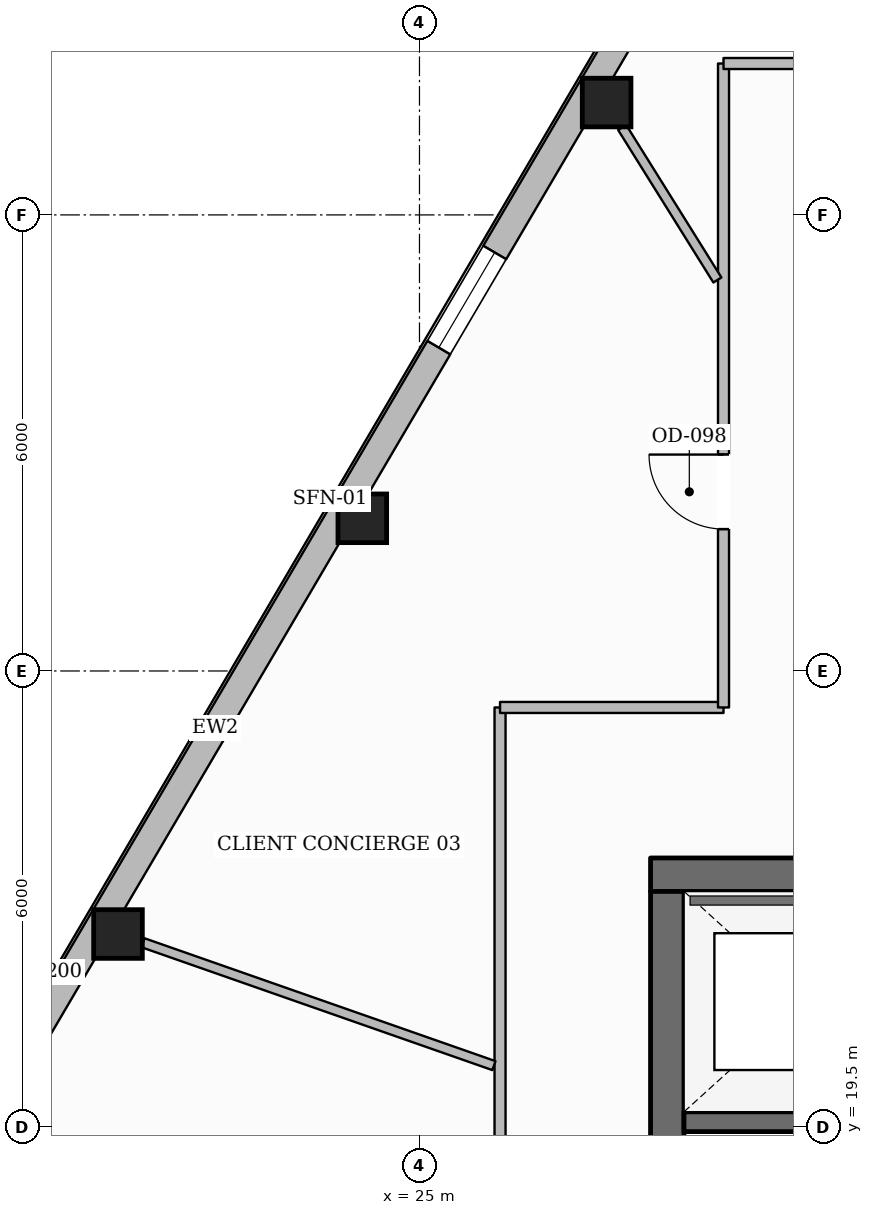
"""IFC4 building model, lengths in metres.
Left out: names, types, materials, properties, quantities, classifications, styles, units other than length and angle.
Written with IfcOpenShell. Run it as: python <this file> out.ifc"""

import sys

from ifc_helpers import new_model, si_unit, direction, frame, frame_2d, origin, origin_2d, place, context, subcontext, project, spatial, rectangle, hollow_rectangle, extrude, element, fill, save


model = new_model("IFC4")
c1 = context("Model", 3, precision=1e-05, world=origin(), true_north=direction((0.0, 1.0)))
c2 = subcontext(c1, "Body", "Model", "MODEL_VIEW")
j1 = project(units=[si_unit("LENGTHUNIT", "METRE"), si_unit("PLANEANGLEUNIT", "RADIAN")], contexts=[c1])
p1 = place(None, origin())
s1 = spatial("IfcSite", under=j1, at=p1, CompositionType="ELEMENT")
p2 = place(p1, origin())
s2 = spatial("IfcBuilding", under=s1, at=p2, CompositionType="ELEMENT")
p3 = place(p2, frame((0.0, 0.0, 215.05)))
s3 = spatial("IfcBuildingStorey", under=s2, at=p3, CompositionType="ELEMENT", Elevation=215.05)
p4 = place(p3, frame((28.04, 22.82, 0.0), z_axis=(0.0, 0.0, 1.0), x_axis=(1.0, 0.0, 0.0)))
e1 = element("IfcWall", 1, at=p4, inside=s3, PredefinedType="SOLIDWALL", context=c2, shape_type="SweptSolid", body=[
    extrude(rectangle(XDim=19.92, YDim=0.44, at=frame_2d((9.96, 0.0))), origin(), (0.0, 0.0, 1.0), 3.6),
])
p5 = place(p4, frame((6.235, 0.0, 0.0)))
e2 = element("IfcOpeningElement", 2, at=p5, cuts=e1, PredefinedType="OPENING", context=c2, shape_type="SweptSolid", body=[
    extrude(rectangle(XDim=1.05, YDim=2.15, at=frame_2d((0.525, 1.075))), frame((0.0, 0.23, 0.0), z_axis=(0.0, -1.0, 0.0), x_axis=(1.0, 0.0, 0.0)), (0.0, 0.0, 1.0), 0.46),
])
p6 = place(p4, frame((12.635, 0.0, 0.0)))
e3 = element("IfcOpeningElement", 3, at=p6, cuts=e1, PredefinedType="OPENING", context=c2, shape_type="SweptSolid", body=[
    extrude(rectangle(XDim=1.05, YDim=2.15, at=frame_2d((0.525, 1.075))), frame((0.0, 0.23, 0.0), z_axis=(0.0, -1.0, 0.0), x_axis=(1.0, 0.0, 0.0)), (0.0, 0.0, 1.0), 0.46),
])
p7 = place(p3, frame((28.26, 9.6, 0.0), z_axis=(0.0, 0.0, 1.0), x_axis=(0.0, 1.0, 0.0)))
e4 = element("IfcWall", 4, at=p7, inside=s3, PredefinedType="SOLIDWALL", context=c2, shape_type="SweptSolid", body=[
    extrude(rectangle(XDim=13.0, YDim=0.44, at=frame_2d((6.5, 0.0))), origin(), (0.0, 0.0, 1.0), 3.6),
])
p8 = place(p7, frame((0.2, 0.0, 0.0)))
e5 = element("IfcOpeningElement", 5, at=p8, cuts=e4, PredefinedType="OPENING", context=c2, shape_type="SweptSolid", body=[
    extrude(rectangle(XDim=1.1, YDim=2.15, at=frame_2d((0.55, 1.075))), frame((0.0, 0.23, 0.0), z_axis=(0.0, -1.0, 0.0), x_axis=(1.0, 0.0, 0.0)), (0.0, 0.0, 1.0), 0.46),
])
p9 = place(p7, frame((8.4, 0.0, 0.0)))
e6 = element("IfcOpeningElement", 6, at=p9, cuts=e4, PredefinedType="OPENING", context=c2, shape_type="SweptSolid", body=[
    extrude(rectangle(XDim=0.9, YDim=2.1, at=frame_2d((0.45, 1.05))), frame((0.0, 0.23, 0.0), z_axis=(0.0, -1.0, 0.0), x_axis=(1.0, 0.0, 0.0)), (0.0, 0.0, 1.0), 0.46),
])
p10 = place(p3, frame((28.48, 19.57, 0.0), z_axis=(0.0, 0.0, 1.0), x_axis=(1.0, 0.0, 0.0)))
e7 = element("IfcWall", 7, at=p10, inside=s3, PredefinedType="SHEAR", context=c2, shape_type="SweptSolid", body=[
    extrude(rectangle(XDim=3.2, YDim=0.26, at=frame_2d((1.6, 0.0))), origin(), (0.0, 0.0, 1.0), 3.6),
])
for number, where, z_axis, x_axis in (
    (8, (27.462, 32.978, 0.0), (0.0, 0.0, 1.0), (1.0, 0.0, 0.0)),
    (9, (24.248, 27.509, 0.0), (0.0, 0.0, 1.0), (1.0, 0.0, 0.0)),
    (10, (21.034, 22.04, 0.0), (0.0, 0.0, 1.0), (1.0, 0.0, 0.0)),
):
    element("IfcColumn", number, at=place(p3, frame(where, z_axis=z_axis, x_axis=x_axis)), inside=s3, PredefinedType="COLUMN", context=c2, shape_type="SweptSolid", body=[
        extrude(hollow_rectangle(XDim=0.64, YDim=0.64, WallThickness=0.028, at=origin_2d()), origin(), (0.0, 0.0, 1.0), 3.6),
    ])
p11 = place(p3, frame((14.13, 10.825, 0.0), z_axis=(0.0, 0.0, 1.0), x_axis=(0.506658543763, 0.862146808863, 0.0)))
e11 = element("IfcWall", 11, at=p11, inside=s3, PredefinedType="STANDARD", context=c2, shape_type="SweptSolid", body=[
    extrude(rectangle(XDim=39.014, YDim=0.35, at=frame_2d((19.507, 0.0))), origin(), (0.0, 0.0, 1.0), 3.132),
])
p12 = place(p11, frame((9.354, 0.0, 0.0)))
e12 = element("IfcOpeningElement", 12, at=p12, cuts=e11, PredefinedType="OPENING", context=c2, shape_type="SweptSolid", body=[
    extrude(rectangle(XDim=1.0, YDim=2.2, at=frame_2d((0.5, 1.1))), frame((0.0, 0.185, 0.0), z_axis=(0.0, -1.0, 0.0), x_axis=(1.0, 0.0, 0.0)), (0.0, 0.0, 1.0), 0.37),
])
p13 = place(p11, frame((34.645, 0.0, 0.65)))
e13 = element("IfcOpeningElement", 13, at=p13, cuts=e11, PredefinedType="OPENING", context=c2, shape_type="SweptSolid", body=[
    extrude(rectangle(XDim=1.45, YDim=1.75, at=frame_2d((0.725, 0.875))), frame((0.0, 0.185, 0.0), z_axis=(0.0, -1.0, 0.0), x_axis=(1.0, 0.0, 0.0)), (0.0, 0.0, 1.0), 0.37),
])
p14 = place(p11, frame((28.301, 0.0, 0.65)))
e14 = element("IfcOpeningElement", 14, at=p14, cuts=e11, PredefinedType="OPENING", context=c2, shape_type="SweptSolid", body=[
    extrude(rectangle(XDim=1.45, YDim=1.75, at=frame_2d((0.725, 0.875))), frame((0.0, 0.185, 0.0), z_axis=(0.0, -1.0, 0.0), x_axis=(1.0, 0.0, 0.0)), (0.0, 0.0, 1.0), 0.37),
])
p15 = place(p11, frame((21.958, 0.0, 0.65)))
e15 = element("IfcOpeningElement", 15, at=p15, cuts=e11, PredefinedType="OPENING", context=c2, shape_type="SweptSolid", body=[
    extrude(rectangle(XDim=1.45, YDim=1.75, at=frame_2d((0.725, 0.875))), frame((0.0, 0.185, 0.0), z_axis=(0.0, -1.0, 0.0), x_axis=(1.0, 0.0, 0.0)), (0.0, 0.0, 1.0), 0.37),
])
p16 = place(p11, frame((2.926, 0.0, 0.65)))
e16 = element("IfcOpeningElement", 16, at=p16, cuts=e11, PredefinedType="OPENING", context=c2, shape_type="SweptSolid", body=[
    extrude(rectangle(XDim=1.45, YDim=1.75, at=frame_2d((0.725, 0.875))), frame((0.0, 0.185, 0.0), z_axis=(0.0, -1.0, 0.0), x_axis=(1.0, 0.0, 0.0)), (0.0, 0.0, 1.0), 0.37),
])
p17 = place(p3, frame((26.06, 17.65, 0.0), z_axis=(0.0, 0.0, 1.0), x_axis=(0.0, 1.0, 0.0)))
e17 = element("IfcWall", 17, at=p17, inside=s3, PredefinedType="PARTITIONING", context=c2, shape_type="SweptSolid", body=[
    extrude(rectangle(XDim=7.37, YDim=0.145, at=frame_2d((3.685, 0.0))), origin(), (0.0, 0.0, 1.0), 3.339),
])
p18 = place(p3, frame((26.06, 25.02, 0.0), z_axis=(0.0, 0.0, 1.0), x_axis=(1.0, 0.0, 0.0)))
e18 = element("IfcWall", 18, at=p18, inside=s3, PredefinedType="PARTITIONING", context=c2, shape_type="SweptSolid", body=[
    extrude(rectangle(XDim=2.94, YDim=0.145, at=frame_2d((1.47, 0.0))), origin(), (0.0, 0.0, 1.0), 3.6),
])
p19 = place(p3, frame((29.0, 25.02, 0.0), z_axis=(0.0, 0.0, 1.0), x_axis=(0.0, 1.0, 0.0)))
e19 = element("IfcWall", 19, at=p19, inside=s3, PredefinedType="PARTITIONING", context=c2, shape_type="SweptSolid", body=[
    extrude(rectangle(XDim=8.472, YDim=0.145, at=frame_2d((4.236, 0.0))), origin(), (0.0, 0.0, 1.0), 3.6),
])
p20 = place(p19, frame((2.347, 0.0, 0.0)))
e20 = element("IfcOpeningElement", 20, at=p20, cuts=e19, PredefinedType="OPENING", context=c2, shape_type="SweptSolid", body=[
    extrude(rectangle(XDim=0.98, YDim=2.15, at=frame_2d((0.49, 1.075))), frame((0.0, 0.083, 0.0), z_axis=(0.0, -1.0, 0.0), x_axis=(1.0, 0.0, 0.0)), (0.0, 0.0, 1.0), 0.165),
])
p21 = place(p3, frame((29.0, 33.492, 0.0), z_axis=(0.0, 0.0, 1.0), x_axis=(1.0, 0.0, 0.0)))
e21 = element("IfcWall", 21, at=p21, inside=s3, PredefinedType="PARTITIONING", context=c2, shape_type="SweptSolid", body=[
    extrude(rectangle(XDim=2.0, YDim=0.145, at=frame_2d((1.0, 0.0))), origin(), (0.0, 0.0, 1.0), 3.6),
])
p22 = place(p3, frame((28.919, 30.644, 0.0), z_axis=(0.0, 0.0, 1.0), x_axis=(-0.529655581201, 0.848212806613, 0.0)))
e22 = element("IfcWall", 22, at=p22, inside=s3, PredefinedType="PARTITIONING", context=c2, shape_type="SweptSolid", body=[
    extrude(rectangle(XDim=2.365, YDim=0.125, at=frame_2d((1.183, 0.0))), origin(), (0.0, 0.0, 1.0), 3.6),
])
p23 = place(p3, frame((25.979, 20.308, 0.0), z_axis=(0.0, 0.0, 1.0), x_axis=(-0.943825677216, 0.330443778922, 0.0)))
e23 = element("IfcWall", 23, at=p23, inside=s3, PredefinedType="PARTITIONING", context=c2, shape_type="SweptSolid", body=[
    extrude(rectangle(XDim=4.893, YDim=0.125, at=frame_2d((2.446, 0.0))), origin(), (0.0, 0.0, 1.0), 3.6),
])
p24 = place(p15, origin())
e24 = element("IfcWindow", 24, at=p24, inside=s3, PartitioningType="SINGLE_PANEL", PredefinedType="WINDOW", context=c2, shape_type="SweptSolid", body=[
    extrude(rectangle(XDim=1.45, YDim=1.75, at=frame_2d((0.725, 0.875))), frame((0.0, 0.03, 0.0), z_axis=(0.0, -1.0, 0.0), x_axis=(1.0, 0.0, 0.0)), (0.0, 0.0, 1.0), 0.06),
])
fill(e15, e24)
p25 = place(p20, origin())
e25 = element("IfcDoor", 25, at=p25, inside=s3, OperationType="SINGLE_SWING_RIGHT", PredefinedType="DOOR", context=c2, shape_type="SweptSolid", body=[
    extrude(rectangle(XDim=0.98, YDim=2.15, at=frame_2d((0.49, 1.075))), frame((0.0, 0.025, 0.0), z_axis=(0.0, -1.0, 0.0), x_axis=(1.0, 0.0, 0.0)), (0.0, 0.0, 1.0), 0.05),
])
fill(e20, e25)
save(model, sys.argv[1])
